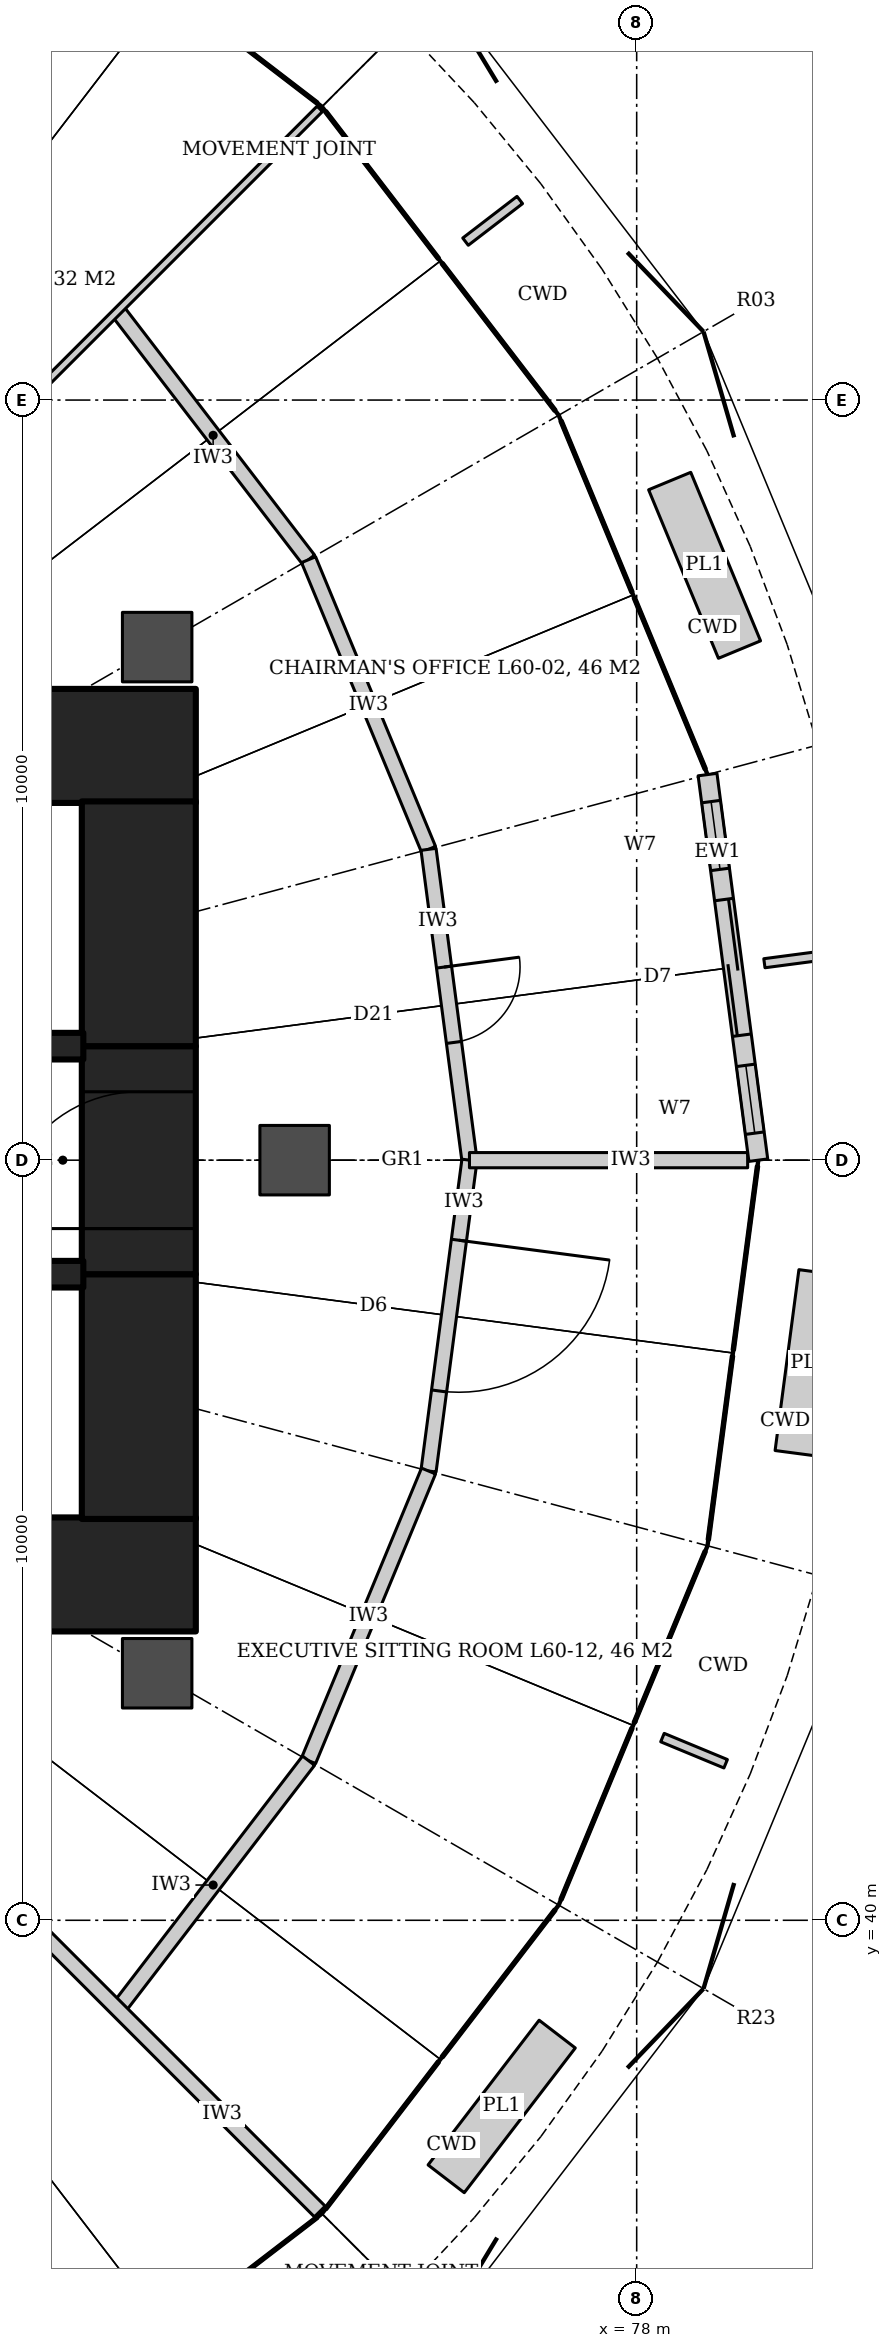
"""IFC4 building model, lengths in metres.
Left out: names, types, materials, properties, quantities, classifications, styles, units other than length and angle.
Written with IfcOpenShell. Run it as: python <this file> out.ifc"""

import sys

from ifc_helpers import new_model, si_unit, direction, frame, frame_2d, origin, origin_2d, place, context, subcontext, project, spatial, rectangle, hollow_circle, extrude, element, fill, save


model = new_model("IFC4")
c1 = context("Model", 3, precision=1e-05, world=origin(), true_north=direction((0.0, 1.0)))
c2 = subcontext(c1, "Body", "Model", "MODEL_VIEW")
j1 = project(units=[si_unit("LENGTHUNIT", "METRE"), si_unit("PLANEANGLEUNIT", "RADIAN")], contexts=[c1])
p1 = place(None, origin())
s1 = spatial("IfcSite", under=j1, at=p1, CompositionType="ELEMENT")
p2 = place(p1, origin())
s2 = spatial("IfcBuilding", under=s1, at=p2, CompositionType="ELEMENT")
p3 = place(p2, frame((0.0, 0.0, 261.2)))
s3 = spatial("IfcBuildingStorey", under=s2, at=p3, CompositionType="ELEMENT", Elevation=261.2)
for number, where, z_axis, x_axis in (
    (1, (64.6, 55.45, 0.0), (0.0, 0.0, 1.0), (1.0, 0.0, 0.0)),
    (2, (64.6, 44.55, 0.0), (0.0, 0.0, 1.0), (1.0, 0.0, 0.0)),
):
    element("IfcWall", number, at=place(p3, frame(where, z_axis=z_axis, x_axis=x_axis)), inside=s3, PredefinedType="SHEAR", context=c2, shape_type="SweptSolid", body=[
        extrude(rectangle(XDim=7.6, YDim=1.5, at=frame_2d((3.8, 0.0))), origin(), (0.0, 0.0, 1.0), 4.2),
    ])
p4 = place(p3, frame((71.45, 45.28, 0.0), z_axis=(0.0, 0.0, 1.0), x_axis=(0.0, 1.0, 0.0)))
e3 = element("IfcWall", 3, at=p4, inside=s3, PredefinedType="SHEAR", context=c2, shape_type="SweptSolid", body=[
    extrude(rectangle(XDim=3.22, YDim=1.5, at=frame_2d((1.61, 0.0))), origin(), (0.0, 0.0, 1.0), 4.2),
])
p5 = place(p3, frame((71.45, 48.5, 0.0), z_axis=(0.0, 0.0, 1.0), x_axis=(0.0, 1.0, 0.0)))
e4 = element("IfcWall", 4, at=p5, inside=s3, PredefinedType="SHEAR", context=c2, shape_type="SweptSolid", body=[
    extrude(rectangle(XDim=3.0, YDim=1.5, at=frame_2d((1.5, 0.0))), origin(), (0.0, 0.0, 1.0), 4.2),
])
p6 = place(p5, frame((0.6, 0.0, 0.0)))
e5 = element("IfcOpeningElement", 5, at=p6, cuts=e4, PredefinedType="OPENING", context=c2, shape_type="SweptSolid", body=[
    extrude(rectangle(XDim=1.8, YDim=2.1, at=frame_2d((0.9, 1.05))), frame((0.0, 0.76, 0.0), z_axis=(0.0, -1.0, 0.0), x_axis=(1.0, 0.0, 0.0)), (0.0, 0.0, 1.0), 1.52),
])
p7 = place(p3, frame((71.45, 51.5, 0.0), z_axis=(0.0, 0.0, 1.0), x_axis=(0.0, 1.0, 0.0)))
e6 = element("IfcWall", 6, at=p7, inside=s3, PredefinedType="SHEAR", context=c2, shape_type="SweptSolid", body=[
    extrude(rectangle(XDim=3.22, YDim=1.5, at=frame_2d((1.61, 0.0))), origin(), (0.0, 0.0, 1.0), 4.2),
])
p8 = place(p3, frame((64.6, 51.5, 0.0), z_axis=(0.0, 0.0, 1.0), x_axis=(1.0, 0.0, 0.0)))
e7 = element("IfcWall", 7, at=p8, inside=s3, PredefinedType="SHEAR", context=c2, shape_type="SweptSolid", body=[
    extrude(rectangle(XDim=6.12, YDim=0.35, at=frame_2d((3.06, 0.0))), origin(), (0.0, 0.0, 1.0), 4.2),
])
p9 = place(p8, frame((1.0, 0.0, 0.0)))
e8 = element("IfcOpeningElement", 8, at=p9, cuts=e7, PredefinedType="OPENING", context=c2, shape_type="SweptSolid", body=[
    extrude(rectangle(XDim=1.2, YDim=2.1, at=frame_2d((0.6, 1.05))), frame((0.0, 0.185, 0.0), z_axis=(0.0, -1.0, 0.0), x_axis=(1.0, 0.0, 0.0)), (0.0, 0.0, 1.0), 0.37),
])
p10 = place(p8, frame((4.2, 0.0, 0.0)))
e9 = element("IfcOpeningElement", 9, at=p10, cuts=e7, PredefinedType="OPENING", context=c2, shape_type="SweptSolid", body=[
    extrude(rectangle(XDim=1.2, YDim=2.1, at=frame_2d((0.6, 1.05))), frame((0.0, 0.185, 0.0), z_axis=(0.0, -1.0, 0.0), x_axis=(1.0, 0.0, 0.0)), (0.0, 0.0, 1.0), 0.37),
])
p11 = place(p3, frame((64.6, 48.5, 0.0), z_axis=(0.0, 0.0, 1.0), x_axis=(1.0, 0.0, 0.0)))
e10 = element("IfcWall", 10, at=p11, inside=s3, PredefinedType="SHEAR", context=c2, shape_type="SweptSolid", body=[
    extrude(rectangle(XDim=6.12, YDim=0.35, at=frame_2d((3.06, 0.0))), origin(), (0.0, 0.0, 1.0), 4.2),
])
p12 = place(p11, frame((0.5, 0.0, 0.0)))
e11 = element("IfcOpeningElement", 11, at=p12, cuts=e10, PredefinedType="OPENING", context=c2, shape_type="SweptSolid", body=[
    extrude(rectangle(XDim=1.0, YDim=2.1, at=frame_2d((0.5, 1.05))), frame((0.0, 0.185, 0.0), z_axis=(0.0, -1.0, 0.0), x_axis=(1.0, 0.0, 0.0)), (0.0, 0.0, 1.0), 0.37),
])
for number, where, z_axis, x_axis in (
    (12, (73.5, 50.0, 0.0), (0.0, 0.0, 1.0), (1.0, 0.0, 0.0)),
    (13, (71.691, 56.75, 0.0), (0.0, 0.0, 1.0), (1.0, 0.0, 0.0)),
    (14, (71.691, 43.25, 0.0), (0.0, 0.0, 1.0), (1.0, 0.0, 0.0)),
):
    element("IfcColumn", number, at=place(p3, frame(where, z_axis=z_axis, x_axis=x_axis)), inside=s3, PredefinedType="COLUMN", context=c2, shape_type="SweptSolid", body=[
        extrude(hollow_circle(Radius=0.457, WallThickness=0.045, at=origin_2d()), origin(), (0.0, 0.0, 1.0), 4.2),
    ])
p13 = place(p3, frame((71.172, 61.172, 0.0), z_axis=(0.0, 0.0, 1.0), x_axis=(0.608714823874, -0.793389099494, 0.0)))
e15 = element("IfcWall", 15, at=p13, inside=s3, PredefinedType="PARTITIONING", context=c2, shape_type="SweptSolid", body=[
    extrude(rectangle(XDim=4.125, YDim=0.2, at=frame_2d((2.062, 0.0))), origin(), (0.0, 0.0, 1.0), 3.02),
])
p14 = place(p3, frame((73.683, 57.9, 0.0), z_axis=(0.0, 0.0, 1.0), x_axis=(0.382731667114, -0.923859551549, 0.0)))
e16 = element("IfcWall", 16, at=p14, inside=s3, PredefinedType="PARTITIONING", context=c2, shape_type="SweptSolid", body=[
    extrude(rectangle(XDim=4.125, YDim=0.2, at=frame_2d((2.062, 0.0))), origin(), (0.0, 0.0, 1.0), 3.02),
])
p15 = place(p3, frame((75.262, 54.089, 0.0), z_axis=(0.0, 0.0, 1.0), x_axis=(0.130515758099, -0.991446234996, 0.0)))
e17 = element("IfcWall", 17, at=p15, inside=s3, PredefinedType="PARTITIONING", context=c2, shape_type="SweptSolid", body=[
    extrude(rectangle(XDim=4.125, YDim=0.2, at=frame_2d((2.062, 0.0))), origin(), (0.0, 0.0, 1.0), 3.02),
])
p16 = place(p15, frame((1.562, 0.0, 0.0)))
e18 = element("IfcOpeningElement", 18, at=p16, cuts=e17, PredefinedType="OPENING", context=c2, shape_type="SweptSolid", body=[
    extrude(rectangle(XDim=1.0, YDim=2.7, at=frame_2d((0.5, 1.35))), frame((0.0, 0.11, 0.0), z_axis=(0.0, -1.0, 0.0), x_axis=(1.0, 0.0, 0.0)), (0.0, 0.0, 1.0), 0.22),
])
p17 = place(p3, frame((75.8, 50.0, 0.0), z_axis=(0.0, 0.0, 1.0), x_axis=(-0.130515758099, -0.991446234996, 0.0)))
e19 = element("IfcWall", 19, at=p17, inside=s3, PredefinedType="PARTITIONING", context=c2, shape_type="SweptSolid", body=[
    extrude(rectangle(XDim=4.125, YDim=0.2, at=frame_2d((2.062, 0.0))), origin(), (0.0, 0.0, 1.0), 3.02),
])
p18 = place(p17, frame((1.062, 0.0, 0.0)))
e20 = element("IfcOpeningElement", 20, at=p18, cuts=e19, PredefinedType="OPENING", context=c2, shape_type="SweptSolid", body=[
    extrude(rectangle(XDim=2.0, YDim=2.1, at=frame_2d((1.0, 1.05))), frame((0.0, 0.11, 0.0), z_axis=(0.0, -1.0, 0.0), x_axis=(1.0, 0.0, 0.0)), (0.0, 0.0, 1.0), 0.22),
])
p19 = place(p3, frame((75.262, 45.911, 0.0), z_axis=(0.0, 0.0, 1.0), x_axis=(-0.382731667114, -0.923859551549, 0.0)))
e21 = element("IfcWall", 21, at=p19, inside=s3, PredefinedType="PARTITIONING", context=c2, shape_type="SweptSolid", body=[
    extrude(rectangle(XDim=4.125, YDim=0.2, at=frame_2d((2.062, 0.0))), origin(), (0.0, 0.0, 1.0), 3.02),
])
p20 = place(p3, frame((73.683, 42.1, 0.0), z_axis=(0.0, 0.0, 1.0), x_axis=(-0.608714823874, -0.793389099494, 0.0)))
e22 = element("IfcWall", 22, at=p20, inside=s3, PredefinedType="PARTITIONING", context=c2, shape_type="SweptSolid", body=[
    extrude(rectangle(XDim=4.125, YDim=0.2, at=frame_2d((2.062, 0.0))), origin(), (0.0, 0.0, 1.0), 3.02),
])
p21 = place(p3, frame((75.8, 50.0, 0.0), z_axis=(0.0, 0.0, 1.0), x_axis=(1.0, 0.0, 0.0)))
e23 = element("IfcWall", 23, at=p21, inside=s3, PredefinedType="PARTITIONING", context=c2, shape_type="SweptSolid", body=[
    extrude(rectangle(XDim=3.66, YDim=0.2, at=frame_2d((1.83, 0.0))), origin(), (0.0, 0.0, 1.0), 3.02),
])
p22 = place(p3, frame((68.0, 58.0, 0.0), z_axis=(0.0, 0.0, 1.0), x_axis=(0.707106781187, 0.707106781187, 0.0)))
e24 = element("IfcWall", 24, at=p22, inside=s3, PredefinedType="PARTITIONING", context=c2, shape_type="SweptSolid", body=[
    extrude(rectangle(XDim=8.246, YDim=0.1, at=frame_2d((4.123, 0.0))), origin(), (0.0, 0.0, 1.0), 3.02),
])
p23 = place(p22, frame((1.793, 0.0, 0.0)))
e25 = element("IfcOpeningElement", 25, at=p23, cuts=e24, PredefinedType="OPENING", context=c2, shape_type="SweptSolid", body=[
    extrude(rectangle(XDim=0.9, YDim=2.4, at=frame_2d((0.45, 1.2))), frame((0.0, 0.06, 0.0), z_axis=(0.0, -1.0, 0.0), x_axis=(1.0, 0.0, 0.0)), (0.0, 0.0, 1.0), 0.12),
])
p24 = place(p3, frame((68.0, 42.0, 0.0), z_axis=(0.0, 0.0, 1.0), x_axis=(0.707106781187, -0.707106781187, 0.0)))
e26 = element("IfcWall", 26, at=p24, inside=s3, PredefinedType="PARTITIONING", context=c2, shape_type="SweptSolid", body=[
    extrude(rectangle(XDim=8.246, YDim=0.2, at=frame_2d((4.123, 0.0))), origin(), (0.0, 0.0, 1.0), 3.02),
])
p25 = place(p3, frame((79.6, 50.0, 0.0), z_axis=(0.0, 0.0, 1.0), x_axis=(-0.130550788349, 0.991441622922, 0.0)))
e27 = element("IfcWall", 27, at=p25, inside=s3, PredefinedType="SOLIDWALL", context=c2, shape_type="SweptSolid", body=[
    extrude(rectangle(XDim=5.116, YDim=0.25, at=frame_2d((2.558, 0.0))), origin(), (0.0, 0.0, 1.0), 4.04),
])
p26 = place(p25, frame((1.658, 0.0, 0.0)))
e28 = element("IfcOpeningElement", 28, at=p26, cuts=e27, PredefinedType="OPENING", context=c2, shape_type="SweptSolid", body=[
    extrude(rectangle(XDim=1.8, YDim=2.4, at=frame_2d((0.9, 1.2))), frame((0.0, 0.135, 0.0), z_axis=(0.0, -1.0, 0.0), x_axis=(1.0, 0.0, 0.0)), (0.0, 0.0, 1.0), 0.27),
])
p27 = place(p25, frame((0.358, 0.0, 0.0)))
e29 = element("IfcOpeningElement", 29, at=p27, cuts=e27, PredefinedType="OPENING", context=c2, shape_type="SweptSolid", body=[
    extrude(rectangle(XDim=0.9, YDim=2.4, at=frame_2d((0.45, 1.2))), frame((0.0, 0.135, 0.0), z_axis=(0.0, -1.0, 0.0), x_axis=(1.0, 0.0, 0.0)), (0.0, 0.0, 1.0), 0.27),
])
p28 = place(p25, frame((3.858, 0.0, 0.0)))
e30 = element("IfcOpeningElement", 30, at=p28, cuts=e27, PredefinedType="OPENING", context=c2, shape_type="SweptSolid", body=[
    extrude(rectangle(XDim=0.9, YDim=2.4, at=frame_2d((0.45, 1.2))), frame((0.0, 0.135, 0.0), z_axis=(0.0, -1.0, 0.0), x_axis=(1.0, 0.0, 0.0)), (0.0, 0.0, 1.0), 0.27),
])
p29 = place(p16, origin())
e31 = element("IfcDoor", 31, at=p29, inside=s3, OperationType="SINGLE_SWING_LEFT", PredefinedType="DOOR", context=c2, shape_type="SweptSolid", body=[
    extrude(rectangle(XDim=1.0, YDim=2.7, at=frame_2d((0.5, 1.35))), frame((0.0, 0.025, 0.0), z_axis=(0.0, -1.0, 0.0), x_axis=(1.0, 0.0, 0.0)), (0.0, 0.0, 1.0), 0.05),
])
fill(e18, e31)
p30 = place(p18, origin())
e32 = element("IfcDoor", 32, at=p30, inside=s3, OperationType="DOUBLE_DOOR_DOUBLE_SWING", PredefinedType="DOOR", context=c2, shape_type="SweptSolid", body=[
    extrude(rectangle(XDim=2.0, YDim=2.1, at=frame_2d((1.0, 1.05))), frame((0.0, 0.025, 0.0), z_axis=(0.0, -1.0, 0.0), x_axis=(1.0, 0.0, 0.0)), (0.0, 0.0, 1.0), 0.05),
])
fill(e20, e32)
p31 = place(p26, origin())
e33 = element("IfcDoor", 33, at=p31, inside=s3, OperationType="DOUBLE_DOOR_SLIDING", PredefinedType="DOOR", context=c2, shape_type="SweptSolid", body=[
    extrude(rectangle(XDim=1.8, YDim=2.4, at=frame_2d((0.9, 1.2))), frame((0.0, 0.025, 0.0), z_axis=(0.0, -1.0, 0.0), x_axis=(1.0, 0.0, 0.0)), (0.0, 0.0, 1.0), 0.05),
])
fill(e28, e33)
p32 = place(p27, origin())
e34 = element("IfcWindow", 34, at=p32, inside=s3, PartitioningType="SINGLE_PANEL", PredefinedType="WINDOW", context=c2, shape_type="SweptSolid", body=[
    extrude(rectangle(XDim=0.9, YDim=2.4, at=frame_2d((0.45, 1.2))), frame((0.0, 0.03, 0.0), z_axis=(0.0, -1.0, 0.0), x_axis=(1.0, 0.0, 0.0)), (0.0, 0.0, 1.0), 0.06),
])
fill(e29, e34)
p33 = place(p28, origin())
e35 = element("IfcWindow", 35, at=p33, inside=s3, PartitioningType="SINGLE_PANEL", PredefinedType="WINDOW", context=c2, shape_type="SweptSolid", body=[
    extrude(rectangle(XDim=0.9, YDim=2.4, at=frame_2d((0.45, 1.2))), frame((0.0, 0.03, 0.0), z_axis=(0.0, -1.0, 0.0), x_axis=(1.0, 0.0, 0.0)), (0.0, 0.0, 1.0), 0.06),
])
fill(e30, e35)
p34 = place(p6, origin())
e36 = element("IfcDoor", 36, at=p34, inside=s3, OperationType="DOUBLE_DOOR_DOUBLE_SWING", PredefinedType="DOOR", context=c2, shape_type="SweptSolid", body=[
    extrude(rectangle(XDim=1.8, YDim=2.1, at=frame_2d((0.9, 1.05))), frame((0.0, 0.025, 0.0), z_axis=(0.0, -1.0, 0.0), x_axis=(1.0, 0.0, 0.0)), (0.0, 0.0, 1.0), 0.05),
])
fill(e5, e36)
save(model, sys.argv[1])
